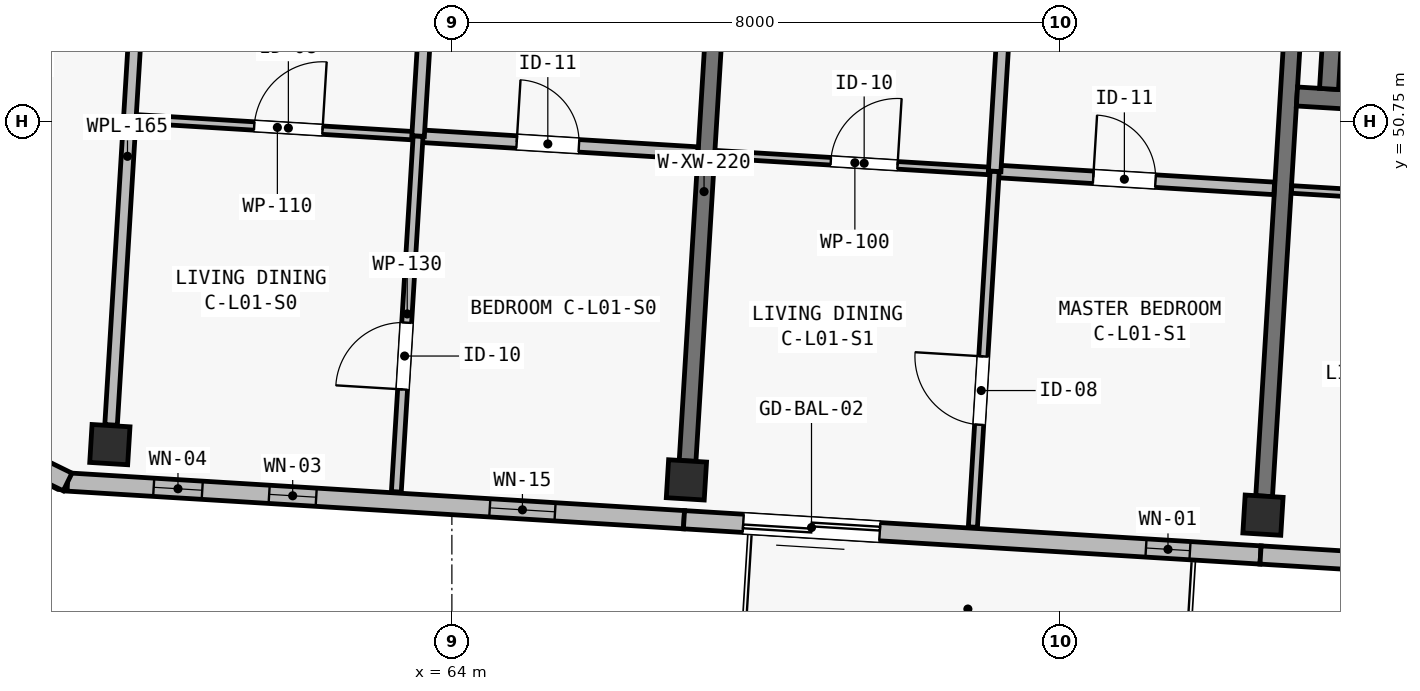
"""IFC4 building model, lengths in metres.
Left out: names, types, materials, properties, quantities, classifications, styles, units other than length and angle.
Written with IfcOpenShell. Run it as: python <this file> out.ifc"""

import sys

from ifc_helpers import new_model, si_unit, direction, frame, frame_2d, origin, origin_2d, place, context, subcontext, project, spatial, rectangle, extrude, element, fill, save


model = new_model("IFC4")
c1 = context("Model", 3, precision=1e-05, world=origin(), true_north=direction((0.0, 1.0)))
c2 = subcontext(c1, "Body", "Model", "MODEL_VIEW")
j1 = project(units=[si_unit("LENGTHUNIT", "METRE"), si_unit("PLANEANGLEUNIT", "RADIAN")], contexts=[c1])
p1 = place(None, origin())
s1 = spatial("IfcSite", under=j1, at=p1, CompositionType="ELEMENT")
p2 = place(p1, origin())
s2 = spatial("IfcBuilding", under=s1, at=p2, CompositionType="ELEMENT")
p3 = place(p2, frame((0.0, 0.0, 4.5)))
s3 = spatial("IfcBuildingStorey", under=s2, at=p3, CompositionType="ELEMENT", Elevation=4.5)
for number, where, z_axis, x_axis in (
    (1, (59.5, 46.5, 0.0), (0.0, 0.0, 1.0), (0.998, -0.061, 0.0)),
    (2, (67.086, 46.036, 0.0), (0.0, 0.0, 1.0), (0.998, -0.061, 0.0)),
    (3, (74.672, 45.572, 0.0), (0.0, 0.0, 1.0), (0.998, -0.061, 0.0)),
):
    element("IfcColumn", number, at=place(p3, frame(where, z_axis=z_axis, x_axis=x_axis)), inside=s3, PredefinedType="COLUMN", context=c2, shape_type="SweptSolid", body=[
        extrude(rectangle(XDim=0.5, YDim=0.5, at=origin_2d()), origin(), (0.0, 0.0, 1.0), 3.9),
    ])
p4 = place(p3, frame((67.101, 46.286, -0.25), z_axis=(0.0, 0.0, 1.0), x_axis=(0.061035953884, 0.998135568114, 0.0)))
e4 = element("IfcWall", 4, at=p4, inside=s3, PredefinedType="SHEAR", context=c2, shape_type="SweptSolid", body=[
    extrude(rectangle(XDim=7.1, YDim=0.22, at=frame_2d((3.55, 0.0))), origin(), (0.0, 0.0, 1.0), 3.4),
])
p5 = place(p3, frame((74.687, 45.822, -0.25), z_axis=(0.0, 0.0, 1.0), x_axis=(0.061033859059, 0.99813569621, 0.0)))
e5 = element("IfcWall", 5, at=p5, inside=s3, PredefinedType="SHEAR", context=c2, shape_type="SweptSolid", body=[
    extrude(rectangle(XDim=7.1, YDim=0.22, at=frame_2d((3.55, 0.0))), origin(), (0.0, 0.0, 1.0), 3.4),
])
p6 = place(p3, frame((75.119, 51.08, 0.0), z_axis=(0.0, 0.0, 1.0), x_axis=(0.998133370443, -0.061071882298, 0.0)))
e6 = element("IfcWall", 6, at=p6, inside=s3, PredefinedType="SHEAR", context=c2, shape_type="SweptSolid", body=[
    extrude(rectangle(XDim=2.99, YDim=0.25, at=frame_2d((1.495, 0.0))), origin(), (0.0, 0.0, 1.0), 3.9),
])
p7 = place(p3, frame((75.541, 51.179, 0.0), z_axis=(0.0, 0.0, 1.0), x_axis=(0.061037062968, 0.998135500293, 0.0)))
e7 = element("IfcWall", 7, at=p7, inside=s3, PredefinedType="SHEAR", context=c2, shape_type="SweptSolid", body=[
    extrude(rectangle(XDim=1.7, YDim=0.25, at=frame_2d((0.85, 0.0))), origin(), (0.0, 0.0, 1.0), 3.9),
])
p8 = place(p3, frame((67.054, 45.512, 0.0), z_axis=(0.0, 0.0, 1.0), x_axis=(-0.998134248939, 0.061057522844, 0.0)))
e8 = element("IfcWall", 8, at=p8, inside=s3, PredefinedType="SOLIDWALL", context=c2, shape_type="SweptSolid", body=[
    extrude(rectangle(XDim=8.125, YDim=0.24, at=frame_2d((4.062, 0.0))), origin(), (0.0, 0.0, 1.0), 3.65),
])
p9 = place(p8, frame((1.7, 0.0, 0.48)))
e9 = element("IfcOpeningElement", 9, at=p9, cuts=e8, PredefinedType="OPENING", context=c2, shape_type="SweptSolid", body=[
    extrude(rectangle(XDim=0.86, YDim=2.36, at=frame_2d((0.43, 1.18))), frame((0.0, 0.135, 0.0), z_axis=(0.0, -1.0, 0.0), x_axis=(1.0, 0.0, 0.0)), (0.0, 0.0, 1.0), 0.27),
])
p10 = place(p8, frame((4.848, 0.0, 0.48)))
e10 = element("IfcOpeningElement", 10, at=p10, cuts=e8, PredefinedType="OPENING", context=c2, shape_type="SweptSolid", body=[
    extrude(rectangle(XDim=0.62, YDim=2.28, at=frame_2d((0.31, 1.14))), frame((0.0, 0.135, 0.0), z_axis=(0.0, -1.0, 0.0), x_axis=(1.0, 0.0, 0.0)), (0.0, 0.0, 1.0), 0.27),
])
p11 = place(p8, frame((6.35, 0.0, 0.52)))
e11 = element("IfcOpeningElement", 11, at=p11, cuts=e8, PredefinedType="OPENING", context=c2, shape_type="SweptSolid", body=[
    extrude(rectangle(XDim=0.64, YDim=2.18, at=frame_2d((0.32, 1.09))), frame((0.0, 0.135, 0.0), z_axis=(0.0, -1.0, 0.0), x_axis=(1.0, 0.0, 0.0)), (0.0, 0.0, 1.0), 0.27),
])
p12 = place(p3, frame((74.64, 45.048, 0.0), z_axis=(0.0, 0.0, 1.0), x_axis=(-0.998135669243, 0.061034300063, 0.0)))
e12 = element("IfcWall", 12, at=p12, inside=s3, PredefinedType="SOLIDWALL", context=c2, shape_type="SweptSolid", body=[
    extrude(rectangle(XDim=7.6, YDim=0.24, at=frame_2d((3.8, 0.0))), origin(), (0.0, 0.0, 1.0), 3.65),
])
p13 = place(p12, frame((5.019, 0.0, 0.0)))
e13 = element("IfcOpeningElement", 13, at=p13, cuts=e12, PredefinedType="OPENING", context=c2, shape_type="SweptSolid", body=[
    extrude(rectangle(XDim=1.8, YDim=2.12, at=frame_2d((0.9, 1.06))), frame((0.0, 0.135, 0.0), z_axis=(0.0, -1.0, 0.0), x_axis=(1.0, 0.0, 0.0)), (0.0, 0.0, 1.0), 0.27),
])
p14 = place(p12, frame((0.93, 0.0, 0.5)))
e14 = element("IfcOpeningElement", 14, at=p14, cuts=e12, PredefinedType="OPENING", context=c2, shape_type="SweptSolid", body=[
    extrude(rectangle(XDim=0.58, YDim=2.16, at=frame_2d((0.29, 1.08))), frame((0.0, 0.135, 0.0), z_axis=(0.0, -1.0, 0.0), x_axis=(1.0, 0.0, 0.0)), (0.0, 0.0, 1.0), 0.27),
])
p15 = place(p3, frame((82.225, 44.584, 0.0), z_axis=(0.0, 0.0, 1.0), x_axis=(-0.998133591969, 0.061068261669, 0.0)))
e15 = element("IfcWall", 15, at=p15, inside=s3, PredefinedType="SOLIDWALL", context=c2, shape_type="SweptSolid", body=[
    extrude(rectangle(XDim=7.6, YDim=0.24, at=frame_2d((3.8, 0.0))), origin(), (0.0, 0.0, 1.0), 3.65),
])
p16 = place(p15, frame((0.693, 0.0, 0.42)))
e16 = element("IfcOpeningElement", 16, at=p16, cuts=e15, PredefinedType="OPENING", context=c2, shape_type="SweptSolid", body=[
    extrude(rectangle(XDim=0.76, YDim=2.34, at=frame_2d((0.38, 1.17))), frame((0.0, 0.135, 0.0), z_axis=(0.0, -1.0, 0.0), x_axis=(1.0, 0.0, 0.0)), (0.0, 0.0, 1.0), 0.27),
])
p17 = place(p15, frame((3.476, 0.0, 0.42)))
e17 = element("IfcOpeningElement", 17, at=p17, cuts=e15, PredefinedType="OPENING", context=c2, shape_type="SweptSolid", body=[
    extrude(rectangle(XDim=0.82, YDim=2.18, at=frame_2d((0.41, 1.09))), frame((0.0, 0.135, 0.0), z_axis=(0.0, -1.0, 0.0), x_axis=(1.0, 0.0, 0.0)), (0.0, 0.0, 1.0), 0.27),
])
p18 = place(p3, frame((58.944, 46.008, 0.0), z_axis=(0.0, 0.0, 1.0), x_axis=(-0.897775054318, 0.440454256246, 0.0)))
e18 = element("IfcWall", 18, at=p18, inside=s3, PredefinedType="SOLIDWALL", context=c2, shape_type="SweptSolid", body=[
    extrude(rectangle(XDim=8.12, YDim=0.26, at=frame_2d((4.06, 0.0))), origin(), (0.0, 0.0, 1.0), 3.65),
])
p19 = place(p18, frame((2.63, 0.0, 0.52)))
e19 = element("IfcOpeningElement", 19, at=p19, cuts=e18, PredefinedType="OPENING", context=c2, shape_type="SweptSolid", body=[
    extrude(rectangle(XDim=0.58, YDim=2.16, at=frame_2d((0.29, 1.08))), frame((0.0, 0.145, 0.0), z_axis=(0.0, -1.0, 0.0), x_axis=(1.0, 0.0, 0.0)), (0.0, 0.0, 1.0), 0.29),
])
p20 = place(p18, frame((4.41, 0.0, 0.45)))
e20 = element("IfcOpeningElement", 20, at=p20, cuts=e18, PredefinedType="OPENING", context=c2, shape_type="SweptSolid", body=[
    extrude(rectangle(XDim=0.72, YDim=2.16, at=frame_2d((0.36, 1.08))), frame((0.0, 0.145, 0.0), z_axis=(0.0, -1.0, 0.0), x_axis=(1.0, 0.0, 0.0)), (0.0, 0.0, 1.0), 0.29),
])
p21 = place(p3, frame((51.654, 49.585, 0.0), z_axis=(0.0, 0.0, 1.0), x_axis=(0.448621989068, 0.893721607059, 0.0)))
e21 = element("IfcWall", 21, at=p21, inside=s3, PredefinedType="SOLIDWALL", context=c2, shape_type="SweptSolid", body=[
    extrude(rectangle(XDim=19.061, YDim=0.26, at=frame_2d((9.53, 0.0))), origin(), (0.0, 0.0, 1.0), 3.65),
])
p22 = place(p21, frame((2.63, 0.0, 0.52)))
e22 = element("IfcOpeningElement", 22, at=p22, cuts=e21, PredefinedType="OPENING", context=c2, shape_type="SweptSolid", body=[
    extrude(rectangle(XDim=0.58, YDim=2.16, at=frame_2d((0.29, 1.08))), frame((0.0, 0.145, 0.0), z_axis=(0.0, -1.0, 0.0), x_axis=(1.0, 0.0, 0.0)), (0.0, 0.0, 1.0), 0.29),
])
p23 = place(p21, frame((15.35, 0.0, 0.45)))
e23 = element("IfcOpeningElement", 23, at=p23, cuts=e21, PredefinedType="OPENING", context=c2, shape_type="SweptSolid", body=[
    extrude(rectangle(XDim=0.72, YDim=2.16, at=frame_2d((0.36, 1.08))), frame((0.0, 0.145, 0.0), z_axis=(0.0, -1.0, 0.0), x_axis=(1.0, 0.0, 0.0)), (0.0, 0.0, 1.0), 0.29),
])
p24 = place(p3, frame((59.516, 46.76, 0.0), z_axis=(0.0, 0.0, 1.0), x_axis=(0.061034344288, 0.998135666539, 0.0)))
e24 = element("IfcWall", 24, at=p24, inside=s3, PredefinedType="PLUMBINGWALL", context=c2, shape_type="SweptSolid", body=[
    extrude(rectangle(XDim=7.08, YDim=0.165, at=frame_2d((3.54, 0.0))), origin(), (0.0, 0.0, 1.0), 3.15),
])
p25 = place(p3, frame((59.852, 50.786, 0.0), z_axis=(0.0, 0.0, 1.0), x_axis=(0.998137662841, -0.061001688651, 0.0)))
e25 = element("IfcWall", 25, at=p25, inside=s3, PredefinedType="PARTITIONING", context=c2, shape_type="SweptSolid", body=[
    extrude(rectangle(XDim=3.71, YDim=0.11, at=frame_2d((1.855, 0.0))), origin(), (0.0, 0.0, 1.0), 3.62),
])
p26 = place(p25, frame((1.55, 0.0, 0.0)))
e26 = element("IfcOpeningElement", 26, at=p26, cuts=e25, PredefinedType="OPENING", context=c2, shape_type="SweptSolid", body=[
    extrude(rectangle(XDim=0.9, YDim=2.1, at=frame_2d((0.45, 1.05))), frame((0.0, 0.07, 0.0), z_axis=(0.0, -1.0, 0.0), x_axis=(1.0, 0.0, 0.0)), (0.0, 0.0, 1.0), 0.14),
])
p27 = place(p3, frame((63.555, 50.56, 0.0), z_axis=(0.0, 0.0, 1.0), x_axis=(0.998132682596, -0.061083123148, 0.0)))
e27 = element("IfcWall", 27, at=p27, inside=s3, PredefinedType="PLUMBINGWALL", context=c2, shape_type="SweptSolid", body=[
    extrude(rectangle(XDim=3.685, YDim=0.165, at=frame_2d((1.843, 0.0))), origin(), (0.0, 0.0, 1.0), 3.62),
])
p28 = place(p27, frame((1.3, 0.0, 0.0)))
e28 = element("IfcOpeningElement", 28, at=p28, cuts=e27, PredefinedType="OPENING", context=c2, shape_type="SweptSolid", body=[
    extrude(rectangle(XDim=0.82, YDim=2.08, at=frame_2d((0.41, 1.04))), frame((0.0, 0.097, 0.0), z_axis=(0.0, -1.0, 0.0), x_axis=(1.0, 0.0, 0.0)), (0.0, 0.0, 1.0), 0.195),
])
p29 = place(p3, frame((63.269, 45.879, 0.0), z_axis=(0.0, 0.0, 1.0), x_axis=(0.061059262019, 0.998134142549, 0.0)))
e29 = element("IfcWall", 29, at=p29, inside=s3, PredefinedType="PARTITIONING", context=c2, shape_type="SweptSolid", body=[
    extrude(rectangle(XDim=4.69, YDim=0.13, at=frame_2d((2.345, 0.0))), origin(), (0.0, 0.0, 1.0), 3.62),
])
p30 = place(p29, frame((1.35, 0.0, 0.0)))
e30 = element("IfcOpeningElement", 30, at=p30, cuts=e29, PredefinedType="OPENING", context=c2, shape_type="SweptSolid", body=[
    extrude(rectangle(XDim=0.88, YDim=2.1, at=frame_2d((0.44, 1.05))), frame((0.0, 0.08, 0.0), z_axis=(0.0, -1.0, 0.0), x_axis=(1.0, 0.0, 0.0)), (0.0, 0.0, 1.0), 0.16),
])
p31 = place(p3, frame((63.555, 50.56, 0.0), z_axis=(0.0, 0.0, 1.0), x_axis=(0.061038003798, 0.998135442759, 0.0)))
e31 = element("IfcWall", 31, at=p31, inside=s3, PredefinedType="PLUMBINGWALL", context=c2, shape_type="SweptSolid", body=[
    extrude(rectangle(XDim=3.72, YDim=0.165, at=frame_2d((1.86, 0.0))), origin(), (0.0, 0.0, 1.0), 3.62),
])
p32 = place(p3, frame((67.463, 50.321, 0.0), z_axis=(0.0, 0.0, 1.0), x_axis=(0.998132682596, -0.061083123148, 0.0)))
e32 = element("IfcWall", 32, at=p32, inside=s3, PredefinedType="PARTITIONING", context=c2, shape_type="SweptSolid", body=[
    extrude(rectangle(XDim=3.685, YDim=0.1, at=frame_2d((1.843, 0.0))), origin(), (0.0, 0.0, 1.0), 3.62),
])
p33 = place(p32, frame((1.525, 0.0, 0.0)))
e33 = element("IfcOpeningElement", 33, at=p33, cuts=e32, PredefinedType="OPENING", context=c2, shape_type="SweptSolid", body=[
    extrude(rectangle(XDim=0.88, YDim=2.1, at=frame_2d((0.44, 1.05))), frame((0.0, 0.065, 0.0), z_axis=(0.0, -1.0, 0.0), x_axis=(1.0, 0.0, 0.0)), (0.0, 0.0, 1.0), 0.13),
])
p34 = place(p3, frame((71.141, 50.096, 0.0), z_axis=(0.0, 0.0, 1.0), x_axis=(0.998136472989, -0.061021154439, 0.0)))
e34 = element("IfcWall", 34, at=p34, inside=s3, PredefinedType="PLUMBINGWALL", context=c2, shape_type="SweptSolid", body=[
    extrude(rectangle(XDim=3.685, YDim=0.165, at=frame_2d((1.842, 0.0))), origin(), (0.0, 0.0, 1.0), 3.62),
])
p35 = place(p34, frame((1.3, 0.0, 0.0)))
e35 = element("IfcOpeningElement", 35, at=p35, cuts=e34, PredefinedType="OPENING", context=c2, shape_type="SweptSolid", body=[
    extrude(rectangle(XDim=0.82, YDim=2.08, at=frame_2d((0.41, 1.04))), frame((0.0, 0.097, 0.0), z_axis=(0.0, -1.0, 0.0), x_axis=(1.0, 0.0, 0.0)), (0.0, 0.0, 1.0), 0.195),
])
p36 = place(p3, frame((70.855, 45.415, 0.0), z_axis=(0.0, 0.0, 1.0), x_axis=(0.061062434628, 0.998133948465, 0.0)))
e36 = element("IfcWall", 36, at=p36, inside=s3, PredefinedType="PARTITIONING", context=c2, shape_type="SweptSolid", body=[
    extrude(rectangle(XDim=4.69, YDim=0.12, at=frame_2d((2.345, 0.0))), origin(), (0.0, 0.0, 1.0), 3.62),
])
p37 = place(p36, frame((1.35, 0.0, 0.0)))
e37 = element("IfcOpeningElement", 37, at=p37, cuts=e36, PredefinedType="OPENING", context=c2, shape_type="SweptSolid", body=[
    extrude(rectangle(XDim=0.9, YDim=2.1, at=frame_2d((0.45, 1.05))), frame((0.0, 0.075, 0.0), z_axis=(0.0, -1.0, 0.0), x_axis=(1.0, 0.0, 0.0)), (0.0, 0.0, 1.0), 0.15),
])
p38 = place(p3, frame((71.141, 50.096, 0.0), z_axis=(0.0, 0.0, 1.0), x_axis=(0.061034005467, 0.998135687257, 0.0)))
e38 = element("IfcWall", 38, at=p38, inside=s3, PredefinedType="PLUMBINGWALL", context=c2, shape_type="SweptSolid", body=[
    extrude(rectangle(XDim=3.72, YDim=0.165, at=frame_2d((1.86, 0.0))), origin(), (0.0, 0.0, 1.0), 3.62),
])
p39 = place(p3, frame((75.049, 49.857, 0.0), z_axis=(0.0, 0.0, 1.0), x_axis=(0.998135637207, -0.061034823981, 0.0)))
e39 = element("IfcWall", 39, at=p39, inside=s3, PredefinedType="PARTITIONING", context=c2, shape_type="SweptSolid", body=[
    extrude(rectangle(XDim=5.08, YDim=0.1, at=frame_2d((2.54, 0.0))), origin(), (0.0, 0.0, 1.0), 3.62),
])
p40 = place(p39, frame((3.595, 0.0, 0.0)))
e40 = element("IfcOpeningElement", 40, at=p40, cuts=e39, PredefinedType="OPENING", context=c2, shape_type="SweptSolid", body=[
    extrude(rectangle(XDim=0.88, YDim=2.1, at=frame_2d((0.44, 1.05))), frame((0.0, 0.065, 0.0), z_axis=(0.0, -1.0, 0.0), x_axis=(1.0, 0.0, 0.0)), (0.0, 0.0, 1.0), 0.13),
])
p41 = place(p9, origin())
e41 = element("IfcWindow", 41, at=p41, inside=s3, PartitioningType="SINGLE_PANEL", PredefinedType="WINDOW", context=c2, shape_type="SweptSolid", body=[
    extrude(rectangle(XDim=0.86, YDim=2.36, at=frame_2d((0.43, 1.18))), frame((0.0, 0.03, 0.0), z_axis=(0.0, -1.0, 0.0), x_axis=(1.0, 0.0, 0.0)), (0.0, 0.0, 1.0), 0.06),
])
fill(e9, e41)
p42 = place(p10, origin())
e42 = element("IfcWindow", 42, at=p42, inside=s3, PartitioningType="SINGLE_PANEL", PredefinedType="WINDOW", context=c2, shape_type="SweptSolid", body=[
    extrude(rectangle(XDim=0.62, YDim=2.28, at=frame_2d((0.31, 1.14))), frame((0.0, 0.03, 0.0), z_axis=(0.0, -1.0, 0.0), x_axis=(1.0, 0.0, 0.0)), (0.0, 0.0, 1.0), 0.06),
])
fill(e10, e42)
p43 = place(p11, origin())
e43 = element("IfcWindow", 43, at=p43, inside=s3, PartitioningType="SINGLE_PANEL", PredefinedType="WINDOW", context=c2, shape_type="SweptSolid", body=[
    extrude(rectangle(XDim=0.64, YDim=2.18, at=frame_2d((0.32, 1.09))), frame((0.0, 0.03, 0.0), z_axis=(0.0, -1.0, 0.0), x_axis=(1.0, 0.0, 0.0)), (0.0, 0.0, 1.0), 0.06),
])
fill(e11, e43)
p44 = place(p13, origin())
e44 = element("IfcDoor", 44, at=p44, inside=s3, OperationType="SLIDING_TO_LEFT", PredefinedType="DOOR", context=c2, shape_type="SweptSolid", body=[
    extrude(rectangle(XDim=1.8, YDim=2.12, at=frame_2d((0.9, 1.06))), frame((0.0, 0.025, 0.0), z_axis=(0.0, -1.0, 0.0), x_axis=(1.0, 0.0, 0.0)), (0.0, 0.0, 1.0), 0.05),
])
fill(e13, e44)
p45 = place(p14, origin())
e45 = element("IfcWindow", 45, at=p45, inside=s3, PartitioningType="SINGLE_PANEL", PredefinedType="WINDOW", context=c2, shape_type="SweptSolid", body=[
    extrude(rectangle(XDim=0.58, YDim=2.16, at=frame_2d((0.29, 1.08))), frame((0.0, 0.03, 0.0), z_axis=(0.0, -1.0, 0.0), x_axis=(1.0, 0.0, 0.0)), (0.0, 0.0, 1.0), 0.06),
])
fill(e14, e45)
p46 = place(p26, origin())
e46 = element("IfcDoor", 46, at=p46, inside=s3, OperationType="SINGLE_SWING_RIGHT", PredefinedType="DOOR", context=c2, shape_type="SweptSolid", body=[
    extrude(rectangle(XDim=0.9, YDim=2.1, at=frame_2d((0.45, 1.05))), frame((0.0, 0.025, 0.0), z_axis=(0.0, -1.0, 0.0), x_axis=(1.0, 0.0, 0.0)), (0.0, 0.0, 1.0), 0.05),
])
fill(e26, e46)
p47 = place(p28, origin())
e47 = element("IfcDoor", 47, at=p47, inside=s3, OperationType="SINGLE_SWING_LEFT", PredefinedType="DOOR", context=c2, shape_type="SweptSolid", body=[
    extrude(rectangle(XDim=0.82, YDim=2.08, at=frame_2d((0.41, 1.04))), frame((0.0, 0.025, 0.0), z_axis=(0.0, -1.0, 0.0), x_axis=(1.0, 0.0, 0.0)), (0.0, 0.0, 1.0), 0.05),
])
fill(e28, e47)
p48 = place(p30, origin())
e48 = element("IfcDoor", 48, at=p48, inside=s3, OperationType="SINGLE_SWING_LEFT", PredefinedType="DOOR", context=c2, shape_type="SweptSolid", body=[
    extrude(rectangle(XDim=0.88, YDim=2.1, at=frame_2d((0.44, 1.05))), frame((0.0, 0.025, 0.0), z_axis=(0.0, -1.0, 0.0), x_axis=(1.0, 0.0, 0.0)), (0.0, 0.0, 1.0), 0.05),
])
fill(e30, e48)
p49 = place(p33, origin())
e49 = element("IfcDoor", 49, at=p49, inside=s3, OperationType="SINGLE_SWING_RIGHT", PredefinedType="DOOR", context=c2, shape_type="SweptSolid", body=[
    extrude(rectangle(XDim=0.88, YDim=2.1, at=frame_2d((0.44, 1.05))), frame((0.0, 0.025, 0.0), z_axis=(0.0, -1.0, 0.0), x_axis=(1.0, 0.0, 0.0)), (0.0, 0.0, 1.0), 0.05),
])
fill(e33, e49)
p50 = place(p35, origin())
e50 = element("IfcDoor", 50, at=p50, inside=s3, OperationType="SINGLE_SWING_LEFT", PredefinedType="DOOR", context=c2, shape_type="SweptSolid", body=[
    extrude(rectangle(XDim=0.82, YDim=2.08, at=frame_2d((0.41, 1.04))), frame((0.0, 0.025, 0.0), z_axis=(0.0, -1.0, 0.0), x_axis=(1.0, 0.0, 0.0)), (0.0, 0.0, 1.0), 0.05),
])
fill(e35, e50)
p51 = place(p37, origin())
e51 = element("IfcDoor", 51, at=p51, inside=s3, OperationType="SINGLE_SWING_RIGHT", PredefinedType="DOOR", context=c2, shape_type="SweptSolid", body=[
    extrude(rectangle(XDim=0.9, YDim=2.1, at=frame_2d((0.45, 1.05))), frame((0.0, 0.025, 0.0), z_axis=(0.0, -1.0, 0.0), x_axis=(1.0, 0.0, 0.0)), (0.0, 0.0, 1.0), 0.05),
])
fill(e37, e51)
save(model, sys.argv[1])
